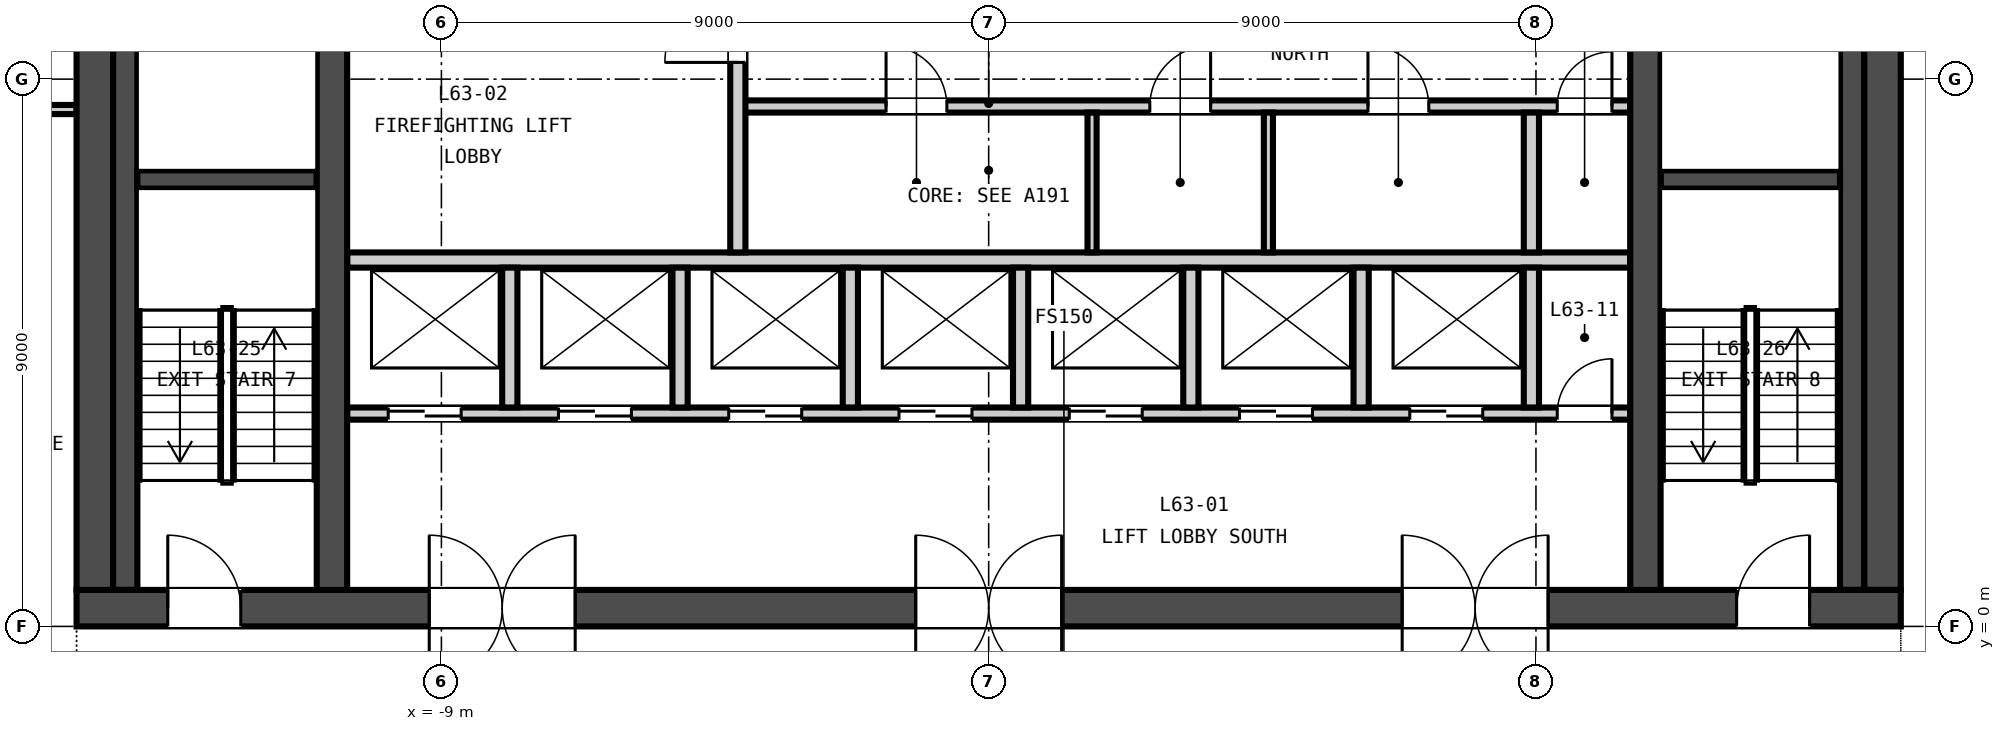
"""IFC4 building model, lengths in metres.
Left out: names, types, materials, properties, quantities, classifications, styles, units other than length and angle.
Written with IfcOpenShell. Run it as: python <this file> out.ifc"""

import sys

from ifc_helpers import new_model, si_unit, direction, frame, frame_2d, origin, place, context, subcontext, project, spatial, rectangle, extrude, element, fill, save


model = new_model("IFC4")
c1 = context("Model", 3, precision=1e-05, world=origin(), true_north=direction((0.0, 1.0)))
c2 = subcontext(c1, "Body", "Model", "MODEL_VIEW")
j1 = project(units=[si_unit("LENGTHUNIT", "METRE"), si_unit("PLANEANGLEUNIT", "RADIAN")], contexts=[c1])
p1 = place(None, origin())
s1 = spatial("IfcSite", under=j1, at=p1, CompositionType="ELEMENT")
p2 = place(p1, origin())
s2 = spatial("IfcBuilding", under=s1, at=p2, CompositionType="ELEMENT")
p3 = place(p2, frame((0.0, 0.0, 249.15)))
s3 = spatial("IfcBuildingStorey", under=s2, at=p3, CompositionType="ELEMENT", Elevation=249.15)
p4 = place(p3, frame((-15.0, 0.3, -0.15), z_axis=(0.0, 0.0, 1.0), x_axis=(1.0, 0.0, 0.0)))
e1 = element("IfcWall", 1, at=p4, inside=s3, PredefinedType="SOLIDWALL", context=c2, shape_type="SweptSolid", body=[
    extrude(rectangle(XDim=30.0, YDim=0.6, at=frame_2d((15.0, 0.0))), origin(), (0.0, 0.0, 1.0), 3.65),
])
p5 = place(p4, frame((5.8, 0.0, 0.15)))
e2 = element("IfcOpeningElement", 2, at=p5, cuts=e1, PredefinedType="OPENING", context=c2, shape_type="SweptSolid", body=[
    extrude(rectangle(XDim=2.4, YDim=2.4, at=frame_2d((1.2, 1.2))), frame((0.0, 0.31, 0.0), z_axis=(0.0, -1.0, 0.0), x_axis=(1.0, 0.0, 0.0)), (0.0, 0.0, 1.0), 0.62),
])
p6 = place(p4, frame((13.8, 0.0, 0.15)))
e3 = element("IfcOpeningElement", 3, at=p6, cuts=e1, PredefinedType="OPENING", context=c2, shape_type="SweptSolid", body=[
    extrude(rectangle(XDim=2.4, YDim=2.4, at=frame_2d((1.2, 1.2))), frame((0.0, 0.31, 0.0), z_axis=(0.0, -1.0, 0.0), x_axis=(1.0, 0.0, 0.0)), (0.0, 0.0, 1.0), 0.62),
])
p7 = place(p4, frame((21.8, 0.0, 0.15)))
e4 = element("IfcOpeningElement", 4, at=p7, cuts=e1, PredefinedType="OPENING", context=c2, shape_type="SweptSolid", body=[
    extrude(rectangle(XDim=2.4, YDim=2.4, at=frame_2d((1.2, 1.2))), frame((0.0, 0.31, 0.0), z_axis=(0.0, -1.0, 0.0), x_axis=(1.0, 0.0, 0.0)), (0.0, 0.0, 1.0), 0.62),
])
p8 = place(p4, frame((1.5, 0.0, 0.15)))
e5 = element("IfcOpeningElement", 5, at=p8, cuts=e1, PredefinedType="OPENING", context=c2, shape_type="SweptSolid", body=[
    extrude(rectangle(XDim=1.2, YDim=2.1, at=frame_2d((0.6, 1.05))), frame((0.0, 0.31, 0.0), z_axis=(0.0, -1.0, 0.0), x_axis=(1.0, 0.0, 0.0)), (0.0, 0.0, 1.0), 0.62),
])
p9 = place(p4, frame((27.3, 0.0, 0.15)))
e6 = element("IfcOpeningElement", 6, at=p9, cuts=e1, PredefinedType="OPENING", context=c2, shape_type="SweptSolid", body=[
    extrude(rectangle(XDim=1.2, YDim=2.1, at=frame_2d((0.6, 1.05))), frame((0.0, 0.31, 0.0), z_axis=(0.0, -1.0, 0.0), x_axis=(1.0, 0.0, 0.0)), (0.0, 0.0, 1.0), 0.62),
])
for number, where, z_axis, x_axis in (
    (7, (-14.7, 0.6, -0.15), (0.0, 0.0, 1.0), (0.0, 1.0, 0.0)),
    (8, (14.7, 0.6, -0.15), (0.0, 0.0, 1.0), (0.0, 1.0, 0.0)),
):
    element("IfcWall", number, at=place(p3, frame(where, z_axis=z_axis, x_axis=x_axis)), inside=s3, PredefinedType="SOLIDWALL", context=c2, shape_type="SweptSolid", body=[
        extrude(rectangle(XDim=13.8, YDim=0.6, at=frame_2d((6.9, 0.0))), origin(), (0.0, 0.0, 1.0), 3.65),
    ])
for number, where, z_axis, x_axis in (
    (9, (-10.8, 0.6, -0.15), (0.0, 0.0, 1.0), (0.0, 1.0, 0.0)),
    (10, (10.8, 0.6, -0.15), (0.0, 0.0, 1.0), (0.0, 1.0, 0.0)),
):
    element("IfcWall", number, at=place(p3, frame(where, z_axis=z_axis, x_axis=x_axis)), inside=s3, PredefinedType="SOLIDWALL", context=c2, shape_type="SweptSolid", body=[
        extrude(rectangle(XDim=13.8, YDim=0.5, at=frame_2d((6.9, 0.0))), origin(), (0.0, 0.0, 1.0), 3.65),
    ])
p10 = place(p3, frame((-10.55, 3.5, 0.0), z_axis=(0.0, 0.0, 1.0), x_axis=(1.0, 0.0, 0.0)))
e11 = element("IfcWall", 11, at=p10, inside=s3, PredefinedType="PARTITIONING", context=c2, shape_type="SweptSolid", body=[
    extrude(rectangle(XDim=21.1, YDim=0.2, at=frame_2d((10.55, 0.0))), origin(), (0.0, 0.0, 1.0), 3.5),
])
p11 = place(p10, frame((0.675, 0.0, 0.0)))
e12 = element("IfcOpeningElement", 12, at=p11, cuts=e11, PredefinedType="OPENING", context=c2, shape_type="SweptSolid", body=[
    extrude(rectangle(XDim=1.2, YDim=2.1, at=frame_2d((0.6, 1.05))), frame((0.0, 0.11, 0.0), z_axis=(0.0, -1.0, 0.0), x_axis=(1.0, 0.0, 0.0)), (0.0, 0.0, 1.0), 0.22),
])
p12 = place(p10, frame((3.475, 0.0, 0.0)))
e13 = element("IfcOpeningElement", 13, at=p12, cuts=e11, PredefinedType="OPENING", context=c2, shape_type="SweptSolid", body=[
    extrude(rectangle(XDim=1.2, YDim=2.1, at=frame_2d((0.6, 1.05))), frame((0.0, 0.11, 0.0), z_axis=(0.0, -1.0, 0.0), x_axis=(1.0, 0.0, 0.0)), (0.0, 0.0, 1.0), 0.22),
])
p13 = place(p10, frame((6.275, 0.0, 0.0)))
e14 = element("IfcOpeningElement", 14, at=p13, cuts=e11, PredefinedType="OPENING", context=c2, shape_type="SweptSolid", body=[
    extrude(rectangle(XDim=1.2, YDim=2.1, at=frame_2d((0.6, 1.05))), frame((0.0, 0.11, 0.0), z_axis=(0.0, -1.0, 0.0), x_axis=(1.0, 0.0, 0.0)), (0.0, 0.0, 1.0), 0.22),
])
p14 = place(p10, frame((9.075, 0.0, 0.0)))
e15 = element("IfcOpeningElement", 15, at=p14, cuts=e11, PredefinedType="OPENING", context=c2, shape_type="SweptSolid", body=[
    extrude(rectangle(XDim=1.2, YDim=2.1, at=frame_2d((0.6, 1.05))), frame((0.0, 0.11, 0.0), z_axis=(0.0, -1.0, 0.0), x_axis=(1.0, 0.0, 0.0)), (0.0, 0.0, 1.0), 0.22),
])
p15 = place(p10, frame((11.875, 0.0, 0.0)))
e16 = element("IfcOpeningElement", 16, at=p15, cuts=e11, PredefinedType="OPENING", context=c2, shape_type="SweptSolid", body=[
    extrude(rectangle(XDim=1.2, YDim=2.1, at=frame_2d((0.6, 1.05))), frame((0.0, 0.11, 0.0), z_axis=(0.0, -1.0, 0.0), x_axis=(1.0, 0.0, 0.0)), (0.0, 0.0, 1.0), 0.22),
])
p16 = place(p10, frame((14.675, 0.0, 0.0)))
e17 = element("IfcOpeningElement", 17, at=p16, cuts=e11, PredefinedType="OPENING", context=c2, shape_type="SweptSolid", body=[
    extrude(rectangle(XDim=1.2, YDim=2.1, at=frame_2d((0.6, 1.05))), frame((0.0, 0.11, 0.0), z_axis=(0.0, -1.0, 0.0), x_axis=(1.0, 0.0, 0.0)), (0.0, 0.0, 1.0), 0.22),
])
p17 = place(p10, frame((17.475, 0.0, 0.0)))
e18 = element("IfcOpeningElement", 18, at=p17, cuts=e11, PredefinedType="OPENING", context=c2, shape_type="SweptSolid", body=[
    extrude(rectangle(XDim=1.2, YDim=2.1, at=frame_2d((0.6, 1.05))), frame((0.0, 0.11, 0.0), z_axis=(0.0, -1.0, 0.0), x_axis=(1.0, 0.0, 0.0)), (0.0, 0.0, 1.0), 0.22),
])
p18 = place(p10, frame((19.9, 0.0, 0.0)))
e19 = element("IfcOpeningElement", 19, at=p18, cuts=e11, PredefinedType="OPENING", context=c2, shape_type="SweptSolid", body=[
    extrude(rectangle(XDim=0.9, YDim=2.1, at=frame_2d((0.45, 1.05))), frame((0.0, 0.11, 0.0), z_axis=(0.0, -1.0, 0.0), x_axis=(1.0, 0.0, 0.0)), (0.0, 0.0, 1.0), 0.22),
])
p19 = place(p3, frame((-10.55, 6.025, 0.0), z_axis=(0.0, 0.0, 1.0), x_axis=(1.0, 0.0, 0.0)))
e20 = element("IfcWall", 20, at=p19, inside=s3, PredefinedType="PARTITIONING", context=c2, shape_type="SweptSolid", body=[
    extrude(rectangle(XDim=21.1, YDim=0.25, at=frame_2d((10.55, 0.0))), origin(), (0.0, 0.0, 1.0), 3.5),
])
p20 = place(p3, frame((-4.125, 8.55, 0.0), z_axis=(0.0, 0.0, 1.0), x_axis=(1.0, 0.0, 0.0)))
e21 = element("IfcWall", 21, at=p20, inside=s3, PredefinedType="PARTITIONING", context=c2, shape_type="SweptSolid", body=[
    extrude(rectangle(XDim=14.675, YDim=0.2, at=frame_2d((7.337, 0.0))), origin(), (0.0, 0.0, 1.0), 3.5),
])
p21 = place(p20, frame((2.438, 0.0, 0.0)))
e22 = element("IfcOpeningElement", 22, at=p21, cuts=e21, PredefinedType="OPENING", context=c2, shape_type="SweptSolid", body=[
    extrude(rectangle(XDim=1.0, YDim=2.1, at=frame_2d((0.5, 1.05))), frame((0.0, 0.11, 0.0), z_axis=(0.0, -1.0, 0.0), x_axis=(1.0, 0.0, 0.0)), (0.0, 0.0, 1.0), 0.22),
])
p22 = place(p20, frame((6.775, 0.0, 0.0)))
e23 = element("IfcOpeningElement", 23, at=p22, cuts=e21, PredefinedType="OPENING", context=c2, shape_type="SweptSolid", body=[
    extrude(rectangle(XDim=1.0, YDim=2.1, at=frame_2d((0.5, 1.05))), frame((0.0, 0.11, 0.0), z_axis=(0.0, -1.0, 0.0), x_axis=(1.0, 0.0, 0.0)), (0.0, 0.0, 1.0), 0.22),
])
p23 = place(p20, frame((10.363, 0.0, 0.0)))
e24 = element("IfcOpeningElement", 24, at=p23, cuts=e21, PredefinedType="OPENING", context=c2, shape_type="SweptSolid", body=[
    extrude(rectangle(XDim=1.0, YDim=2.1, at=frame_2d((0.5, 1.05))), frame((0.0, 0.11, 0.0), z_axis=(0.0, -1.0, 0.0), x_axis=(1.0, 0.0, 0.0)), (0.0, 0.0, 1.0), 0.22),
])
p24 = place(p20, frame((13.475, 0.0, 0.0)))
e25 = element("IfcOpeningElement", 25, at=p24, cuts=e21, PredefinedType="OPENING", context=c2, shape_type="SweptSolid", body=[
    extrude(rectangle(XDim=0.9, YDim=2.1, at=frame_2d((0.45, 1.05))), frame((0.0, 0.11, 0.0), z_axis=(0.0, -1.0, 0.0), x_axis=(1.0, 0.0, 0.0)), (0.0, 0.0, 1.0), 0.22),
])
p25 = place(p3, frame((-4.125, 6.15, 0.0), z_axis=(0.0, 0.0, 1.0), x_axis=(0.0, 1.0, 0.0)))
e26 = element("IfcWall", 26, at=p25, inside=s3, PredefinedType="PARTITIONING", context=c2, shape_type="SweptSolid", body=[
    extrude(rectangle(XDim=4.95, YDim=0.25, at=frame_2d((2.475, 0.0))), origin(), (0.0, 0.0, 1.0), 3.5),
])
p26 = place(p25, frame((3.125, 0.0, 0.0)))
e27 = element("IfcOpeningElement", 27, at=p26, cuts=e26, PredefinedType="OPENING", context=c2, shape_type="SweptSolid", body=[
    extrude(rectangle(XDim=1.2, YDim=2.1, at=frame_2d((0.6, 1.05))), frame((0.0, 0.135, 0.0), z_axis=(0.0, -1.0, 0.0), x_axis=(1.0, 0.0, 0.0)), (0.0, 0.0, 1.0), 0.27),
])
for number, where, z_axis, x_axis in (
    (28, (-7.875, 3.6, 0.0), (0.0, 0.0, 1.0), (0.0, 1.0, 0.0)),
    (29, (-5.075, 3.6, 0.0), (0.0, 0.0, 1.0), (0.0, 1.0, 0.0)),
    (30, (-2.275, 3.6, 0.0), (0.0, 0.0, 1.0), (0.0, 1.0, 0.0)),
    (31, (0.525, 3.6, 0.0), (0.0, 0.0, 1.0), (0.0, 1.0, 0.0)),
    (32, (3.325, 3.6, 0.0), (0.0, 0.0, 1.0), (0.0, 1.0, 0.0)),
    (33, (6.125, 3.6, 0.0), (0.0, 0.0, 1.0), (0.0, 1.0, 0.0)),
    (34, (8.925, 3.6, 0.0), (0.0, 0.0, 1.0), (0.0, 1.0, 0.0)),
):
    element("IfcWall", number, at=place(p3, frame(where, z_axis=z_axis, x_axis=x_axis)), inside=s3, PredefinedType="PARTITIONING", context=c2, shape_type="SweptSolid", body=[
        extrude(rectangle(XDim=2.3, YDim=0.25, at=frame_2d((1.15, 0.0))), origin(), (0.0, 0.0, 1.0), 3.5),
    ])
for number, where, z_axis, x_axis in (
    (35, (1.7, 6.15, 0.0), (0.0, 0.0, 1.0), (0.0, 1.0, 0.0)),
    (36, (4.6, 6.15, 0.0), (0.0, 0.0, 1.0), (0.0, 1.0, 0.0)),
):
    element("IfcWall", number, at=place(p3, frame(where, z_axis=z_axis, x_axis=x_axis)), inside=s3, PredefinedType="PARTITIONING", context=c2, shape_type="SweptSolid", body=[
        extrude(rectangle(XDim=2.3, YDim=0.15, at=frame_2d((1.15, 0.0))), origin(), (0.0, 0.0, 1.0), 3.5),
    ])
p27 = place(p3, frame((8.925, 6.15, 0.0), z_axis=(0.0, 0.0, 1.0), x_axis=(0.0, 1.0, 0.0)))
e37 = element("IfcWall", 37, at=p27, inside=s3, PredefinedType="PARTITIONING", context=c2, shape_type="SweptSolid", body=[
    extrude(rectangle(XDim=2.3, YDim=0.25, at=frame_2d((1.15, 0.0))), origin(), (0.0, 0.0, 1.0), 3.5),
])
p28 = place(p3, frame((-14.0, 7.35, 0.0), z_axis=(0.0, 0.0, 1.0), x_axis=(1.0, 0.0, 0.0)))
e38 = element("IfcWall", 38, at=p28, inside=s3, PredefinedType="SOLIDWALL", context=c2, shape_type="SweptSolid", body=[
    extrude(rectangle(XDim=2.95, YDim=0.3, at=frame_2d((1.475, 0.0))), origin(), (0.0, 0.0, 1.0), 3.5),
])
p29 = place(p3, frame((-14.2, 0.6, 0.0), z_axis=(0.0, 0.0, 1.0), x_axis=(0.0, 1.0, 0.0)))
e39 = element("IfcWall", 39, at=p29, inside=s3, PredefinedType="SOLIDWALL", context=c2, shape_type="SweptSolid", body=[
    extrude(rectangle(XDim=13.8, YDim=0.4, at=frame_2d((6.9, 0.0))), origin(), (0.0, 0.0, 1.0), 3.5),
])
p30 = place(p3, frame((11.05, 7.35, 0.0), z_axis=(0.0, 0.0, 1.0), x_axis=(1.0, 0.0, 0.0)))
e40 = element("IfcWall", 40, at=p30, inside=s3, PredefinedType="SOLIDWALL", context=c2, shape_type="SweptSolid", body=[
    extrude(rectangle(XDim=2.95, YDim=0.3, at=frame_2d((1.475, 0.0))), origin(), (0.0, 0.0, 1.0), 3.5),
])
p31 = place(p3, frame((14.2, 0.6, 0.0), z_axis=(0.0, 0.0, 1.0), x_axis=(0.0, 1.0, 0.0)))
e41 = element("IfcWall", 41, at=p31, inside=s3, PredefinedType="SOLIDWALL", context=c2, shape_type="SweptSolid", body=[
    extrude(rectangle(XDim=13.8, YDim=0.4, at=frame_2d((6.9, 0.0))), origin(), (0.0, 0.0, 1.0), 3.5),
])
p32 = place(p3, frame((-17.125, 8.5, 0.0), z_axis=(0.0, 0.0, 1.0), x_axis=(1.0, 0.0, 0.0)))
e42 = element("IfcWall", 42, at=p32, inside=s3, PredefinedType="PARTITIONING", context=c2, shape_type="SweptSolid", body=[
    extrude(rectangle(XDim=2.125, YDim=0.15, at=frame_2d((1.062, 0.0))), origin(), (0.0, 0.0, 1.0), 2.751),
])
p33 = place(p26, origin())
e43 = element("IfcDoor", 43, at=p33, inside=s3, OperationType="SINGLE_SWING_LEFT", PredefinedType="DOOR", context=c2, shape_type="SweptSolid", body=[
    extrude(rectangle(XDim=1.2, YDim=2.1, at=frame_2d((0.6, 1.05))), frame((0.0, 0.025, 0.0), z_axis=(0.0, -1.0, 0.0), x_axis=(1.0, 0.0, 0.0)), (0.0, 0.0, 1.0), 0.05),
])
fill(e27, e43)
p34 = place(p11, origin())
e44 = element("IfcDoor", 44, at=p34, inside=s3, OperationType="DOUBLE_DOOR_SLIDING", PredefinedType="DOOR", context=c2, shape_type="SweptSolid", body=[
    extrude(rectangle(XDim=1.2, YDim=2.1, at=frame_2d((0.6, 1.05))), frame((0.0, 0.025, 0.0), z_axis=(0.0, -1.0, 0.0), x_axis=(1.0, 0.0, 0.0)), (0.0, 0.0, 1.0), 0.05),
])
fill(e12, e44)
p35 = place(p12, origin())
e45 = element("IfcDoor", 45, at=p35, inside=s3, OperationType="DOUBLE_DOOR_SLIDING", PredefinedType="DOOR", context=c2, shape_type="SweptSolid", body=[
    extrude(rectangle(XDim=1.2, YDim=2.1, at=frame_2d((0.6, 1.05))), frame((0.0, 0.025, 0.0), z_axis=(0.0, -1.0, 0.0), x_axis=(1.0, 0.0, 0.0)), (0.0, 0.0, 1.0), 0.05),
])
fill(e13, e45)
p36 = place(p13, origin())
e46 = element("IfcDoor", 46, at=p36, inside=s3, OperationType="DOUBLE_DOOR_SLIDING", PredefinedType="DOOR", context=c2, shape_type="SweptSolid", body=[
    extrude(rectangle(XDim=1.2, YDim=2.1, at=frame_2d((0.6, 1.05))), frame((0.0, 0.025, 0.0), z_axis=(0.0, -1.0, 0.0), x_axis=(1.0, 0.0, 0.0)), (0.0, 0.0, 1.0), 0.05),
])
fill(e14, e46)
p37 = place(p14, origin())
e47 = element("IfcDoor", 47, at=p37, inside=s3, OperationType="DOUBLE_DOOR_SLIDING", PredefinedType="DOOR", context=c2, shape_type="SweptSolid", body=[
    extrude(rectangle(XDim=1.2, YDim=2.1, at=frame_2d((0.6, 1.05))), frame((0.0, 0.025, 0.0), z_axis=(0.0, -1.0, 0.0), x_axis=(1.0, 0.0, 0.0)), (0.0, 0.0, 1.0), 0.05),
])
fill(e15, e47)
p38 = place(p15, origin())
e48 = element("IfcDoor", 48, at=p38, inside=s3, OperationType="DOUBLE_DOOR_SLIDING", PredefinedType="DOOR", context=c2, shape_type="SweptSolid", body=[
    extrude(rectangle(XDim=1.2, YDim=2.1, at=frame_2d((0.6, 1.05))), frame((0.0, 0.025, 0.0), z_axis=(0.0, -1.0, 0.0), x_axis=(1.0, 0.0, 0.0)), (0.0, 0.0, 1.0), 0.05),
])
fill(e16, e48)
p39 = place(p16, origin())
e49 = element("IfcDoor", 49, at=p39, inside=s3, OperationType="DOUBLE_DOOR_SLIDING", PredefinedType="DOOR", context=c2, shape_type="SweptSolid", body=[
    extrude(rectangle(XDim=1.2, YDim=2.1, at=frame_2d((0.6, 1.05))), frame((0.0, 0.025, 0.0), z_axis=(0.0, -1.0, 0.0), x_axis=(1.0, 0.0, 0.0)), (0.0, 0.0, 1.0), 0.05),
])
fill(e17, e49)
p40 = place(p17, origin())
e50 = element("IfcDoor", 50, at=p40, inside=s3, OperationType="DOUBLE_DOOR_SLIDING", PredefinedType="DOOR", context=c2, shape_type="SweptSolid", body=[
    extrude(rectangle(XDim=1.2, YDim=2.1, at=frame_2d((0.6, 1.05))), frame((0.0, 0.025, 0.0), z_axis=(0.0, -1.0, 0.0), x_axis=(1.0, 0.0, 0.0)), (0.0, 0.0, 1.0), 0.05),
])
fill(e18, e50)
p41 = place(p18, origin())
e51 = element("IfcDoor", 51, at=p41, inside=s3, OperationType="SINGLE_SWING_RIGHT", PredefinedType="DOOR", context=c2, shape_type="SweptSolid", body=[
    extrude(rectangle(XDim=0.9, YDim=2.1, at=frame_2d((0.45, 1.05))), frame((0.0, 0.025, 0.0), z_axis=(0.0, -1.0, 0.0), x_axis=(1.0, 0.0, 0.0)), (0.0, 0.0, 1.0), 0.05),
])
fill(e19, e51)
p42 = place(p21, origin())
e52 = element("IfcDoor", 52, at=p42, inside=s3, OperationType="SINGLE_SWING_LEFT", PredefinedType="DOOR", context=c2, shape_type="SweptSolid", body=[
    extrude(rectangle(XDim=1.0, YDim=2.1, at=frame_2d((0.5, 1.05))), frame((0.0, 0.025, 0.0), z_axis=(0.0, -1.0, 0.0), x_axis=(1.0, 0.0, 0.0)), (0.0, 0.0, 1.0), 0.05),
])
fill(e22, e52)
p43 = place(p22, origin())
e53 = element("IfcDoor", 53, at=p43, inside=s3, OperationType="SINGLE_SWING_RIGHT", PredefinedType="DOOR", context=c2, shape_type="SweptSolid", body=[
    extrude(rectangle(XDim=1.0, YDim=2.1, at=frame_2d((0.5, 1.05))), frame((0.0, 0.025, 0.0), z_axis=(0.0, -1.0, 0.0), x_axis=(1.0, 0.0, 0.0)), (0.0, 0.0, 1.0), 0.05),
])
fill(e23, e53)
p44 = place(p23, origin())
e54 = element("IfcDoor", 54, at=p44, inside=s3, OperationType="SINGLE_SWING_LEFT", PredefinedType="DOOR", context=c2, shape_type="SweptSolid", body=[
    extrude(rectangle(XDim=1.0, YDim=2.1, at=frame_2d((0.5, 1.05))), frame((0.0, 0.025, 0.0), z_axis=(0.0, -1.0, 0.0), x_axis=(1.0, 0.0, 0.0)), (0.0, 0.0, 1.0), 0.05),
])
fill(e24, e54)
p45 = place(p24, origin())
e55 = element("IfcDoor", 55, at=p45, inside=s3, OperationType="SINGLE_SWING_RIGHT", PredefinedType="DOOR", context=c2, shape_type="SweptSolid", body=[
    extrude(rectangle(XDim=0.9, YDim=2.1, at=frame_2d((0.45, 1.05))), frame((0.0, 0.025, 0.0), z_axis=(0.0, -1.0, 0.0), x_axis=(1.0, 0.0, 0.0)), (0.0, 0.0, 1.0), 0.05),
])
fill(e25, e55)
p46 = place(p5, origin())
e56 = element("IfcDoor", 56, at=p46, inside=s3, OperationType="DOUBLE_DOOR_DOUBLE_SWING", PredefinedType="DOOR", context=c2, shape_type="SweptSolid", body=[
    extrude(rectangle(XDim=2.4, YDim=2.4, at=frame_2d((1.2, 1.2))), frame((0.0, 0.025, 0.0), z_axis=(0.0, -1.0, 0.0), x_axis=(1.0, 0.0, 0.0)), (0.0, 0.0, 1.0), 0.05),
])
fill(e2, e56)
p47 = place(p6, origin())
e57 = element("IfcDoor", 57, at=p47, inside=s3, OperationType="DOUBLE_DOOR_DOUBLE_SWING", PredefinedType="DOOR", context=c2, shape_type="SweptSolid", body=[
    extrude(rectangle(XDim=2.4, YDim=2.4, at=frame_2d((1.2, 1.2))), frame((0.0, 0.025, 0.0), z_axis=(0.0, -1.0, 0.0), x_axis=(1.0, 0.0, 0.0)), (0.0, 0.0, 1.0), 0.05),
])
fill(e3, e57)
p48 = place(p7, origin())
e58 = element("IfcDoor", 58, at=p48, inside=s3, OperationType="DOUBLE_DOOR_DOUBLE_SWING", PredefinedType="DOOR", context=c2, shape_type="SweptSolid", body=[
    extrude(rectangle(XDim=2.4, YDim=2.4, at=frame_2d((1.2, 1.2))), frame((0.0, 0.025, 0.0), z_axis=(0.0, -1.0, 0.0), x_axis=(1.0, 0.0, 0.0)), (0.0, 0.0, 1.0), 0.05),
])
fill(e4, e58)
p49 = place(p8, origin())
e59 = element("IfcDoor", 59, at=p49, inside=s3, OperationType="SINGLE_SWING_LEFT", PredefinedType="DOOR", context=c2, shape_type="SweptSolid", body=[
    extrude(rectangle(XDim=1.2, YDim=2.1, at=frame_2d((0.6, 1.05))), frame((0.0, 0.025, 0.0), z_axis=(0.0, -1.0, 0.0), x_axis=(1.0, 0.0, 0.0)), (0.0, 0.0, 1.0), 0.05),
])
fill(e5, e59)
p50 = place(p9, origin())
e60 = element("IfcDoor", 60, at=p50, inside=s3, OperationType="SINGLE_SWING_RIGHT", PredefinedType="DOOR", context=c2, shape_type="SweptSolid", body=[
    extrude(rectangle(XDim=1.2, YDim=2.1, at=frame_2d((0.6, 1.05))), frame((0.0, 0.025, 0.0), z_axis=(0.0, -1.0, 0.0), x_axis=(1.0, 0.0, 0.0)), (0.0, 0.0, 1.0), 0.05),
])
fill(e6, e60)
save(model, sys.argv[1])
